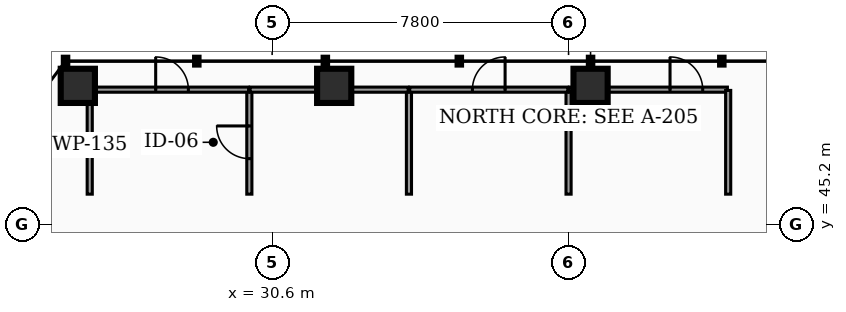
"""IFC4 building model, lengths in metres.
Left out: names, types, materials, properties, quantities, classifications, styles, units other than length and angle.
Written with IfcOpenShell. Run it as: python <this file> out.ifc"""

import sys

from ifc_helpers import new_model, si_unit, direction, frame, frame_2d, origin, origin_2d, place, context, subcontext, project, spatial, rectangle, hollow_rectangle, extrude, element, fill, save


model = new_model("IFC4")
c1 = context("Model", 3, precision=1e-05, world=origin(), true_north=direction((0.0, 1.0)))
c2 = subcontext(c1, "Body", "Model", "MODEL_VIEW")
j1 = project(units=[si_unit("LENGTHUNIT", "METRE"), si_unit("PLANEANGLEUNIT", "RADIAN")], contexts=[c1])
p1 = place(None, origin())
s1 = spatial("IfcSite", under=j1, at=p1, CompositionType="ELEMENT")
p2 = place(p1, origin())
s2 = spatial("IfcBuilding", under=s1, at=p2, CompositionType="ELEMENT")
p3 = place(p2, frame((0.0, 0.0, 96.9)))
s3 = spatial("IfcBuildingStorey", under=s2, at=p3, CompositionType="ELEMENT", Elevation=96.9)
for number, where, z_axis, x_axis in (
    (1, (38.979, 48.85, 0.0), (0.0, 0.0, 1.0), (1.0, 0.0, 0.0)),
    (2, (32.233, 48.85, 0.0), (0.0, 0.0, 1.0), (1.0, 0.0, 0.0)),
    (3, (25.487, 48.85, 0.0), (0.0, 0.0, 1.0), (1.0, 0.0, 0.0)),
):
    element("IfcColumn", number, at=place(p3, frame(where, z_axis=z_axis, x_axis=x_axis)), inside=s3, PredefinedType="COLUMN", context=c2, shape_type="SweptSolid", body=[
        extrude(hollow_rectangle(XDim=0.9, YDim=0.9, WallThickness=0.045, at=origin_2d()), origin(), (0.0, 0.0, 1.0), 3.82),
    ])
p4 = place(p3, frame((30.0, 46.0, 0.0), z_axis=(0.0, 0.0, 1.0), x_axis=(0.0, 1.0, 0.0)))
e4 = element("IfcWall", 4, at=p4, inside=s3, PredefinedType="PARTITIONING", context=c2, shape_type="SweptSolid", body=[
    extrude(rectangle(XDim=2.73, YDim=0.135, at=frame_2d((1.365, 0.0))), origin(), (0.0, 0.0, 1.0), 2.777),
])
p5 = place(p4, frame((0.935, 0.0, 0.0)))
e5 = element("IfcOpeningElement", 5, at=p5, cuts=e4, PredefinedType="OPENING", context=c2, shape_type="SweptSolid", body=[
    extrude(rectangle(XDim=0.86, YDim=2.05, at=frame_2d((0.43, 1.025))), frame((0.0, 0.077, 0.0), z_axis=(0.0, -1.0, 0.0), x_axis=(1.0, 0.0, 0.0)), (0.0, 0.0, 1.0), 0.155),
])
p6 = place(p3, frame((25.951, 48.75, 0.0), z_axis=(0.0, 0.0, 1.0), x_axis=(1.0, 0.0, 0.0)))
e6 = element("IfcWall", 6, at=p6, inside=s3, PredefinedType="PARTITIONING", context=c2, shape_type="SweptSolid", body=[
    extrude(rectangle(XDim=4.029, YDim=0.135, at=frame_2d((2.015, 0.0))), origin(), (0.0, 0.0, 1.0), 2.777),
])
p7 = place(p6, frame((1.584, 0.0, 0.0)))
e7 = element("IfcOpeningElement", 7, at=p7, cuts=e6, PredefinedType="OPENING", context=c2, shape_type="SweptSolid", body=[
    extrude(rectangle(XDim=0.86, YDim=2.05, at=frame_2d((0.43, 1.025))), frame((0.0, 0.077, 0.0), z_axis=(0.0, -1.0, 0.0), x_axis=(1.0, 0.0, 0.0)), (0.0, 0.0, 1.0), 0.155),
])
p8 = place(p3, frame((25.8, 46.0, 0.0), z_axis=(0.0, 0.0, 1.0), x_axis=(0.0, 1.0, 0.0)))
e8 = element("IfcWall", 8, at=p8, inside=s3, PredefinedType="PARTITIONING", context=c2, shape_type="SweptSolid", body=[
    extrude(rectangle(XDim=2.599, YDim=0.135, at=frame_2d((1.3, 0.0))), origin(), (0.0, 0.0, 1.0), 2.777),
])
p9 = place(p3, frame((34.2, 46.0, 0.0), z_axis=(0.0, 0.0, 1.0), x_axis=(0.0, 1.0, 0.0)))
e9 = element("IfcWall", 9, at=p9, inside=s3, PredefinedType="PARTITIONING", context=c2, shape_type="SweptSolid", body=[
    extrude(rectangle(XDim=2.73, YDim=0.135, at=frame_2d((1.365, 0.0))), origin(), (0.0, 0.0, 1.0), 2.777),
])
p10 = place(p3, frame((30.02, 48.75, 0.0), z_axis=(0.0, 0.0, 1.0), x_axis=(1.0, 0.0, 0.0)))
e10 = element("IfcWall", 10, at=p10, inside=s3, PredefinedType="PARTITIONING", context=c2, shape_type="SweptSolid", body=[
    extrude(rectangle(XDim=1.755, YDim=0.135, at=frame_2d((0.877, 0.0))), origin(), (0.0, 0.0, 1.0), 2.777),
])
p11 = place(p3, frame((32.198, 48.75, 0.0), z_axis=(0.0, 0.0, 1.0), x_axis=(1.0, 0.0, 0.0)))
e11 = element("IfcWall", 11, at=p11, inside=s3, PredefinedType="PARTITIONING", context=c2, shape_type="SweptSolid", body=[
    extrude(rectangle(XDim=1.982, YDim=0.135, at=frame_2d((0.991, 0.0))), origin(), (0.0, 0.0, 1.0), 2.777),
])
p12 = place(p3, frame((38.4, 46.0, 0.0), z_axis=(0.0, 0.0, 1.0), x_axis=(0.0, 1.0, 0.0)))
e12 = element("IfcWall", 12, at=p12, inside=s3, PredefinedType="PARTITIONING", context=c2, shape_type="SweptSolid", body=[
    extrude(rectangle(XDim=2.73, YDim=0.135, at=frame_2d((1.365, 0.0))), origin(), (0.0, 0.0, 1.0), 2.777),
])
p13 = place(p3, frame((34.22, 48.75, 0.0), z_axis=(0.0, 0.0, 1.0), x_axis=(1.0, 0.0, 0.0)))
e13 = element("IfcWall", 13, at=p13, inside=s3, PredefinedType="PARTITIONING", context=c2, shape_type="SweptSolid", body=[
    extrude(rectangle(XDim=4.16, YDim=0.135, at=frame_2d((2.08, 0.0))), origin(), (0.0, 0.0, 1.0), 2.777),
])
p14 = place(p13, frame((1.65, 0.0, 0.0)))
e14 = element("IfcOpeningElement", 14, at=p14, cuts=e13, PredefinedType="OPENING", context=c2, shape_type="SweptSolid", body=[
    extrude(rectangle(XDim=0.86, YDim=2.05, at=frame_2d((0.43, 1.025))), frame((0.0, 0.077, 0.0), z_axis=(0.0, -1.0, 0.0), x_axis=(1.0, 0.0, 0.0)), (0.0, 0.0, 1.0), 0.155),
])
p15 = place(p3, frame((38.42, 48.75, 0.0), z_axis=(0.0, 0.0, 1.0), x_axis=(1.0, 0.0, 0.0)))
e15 = element("IfcWall", 15, at=p15, inside=s3, PredefinedType="PARTITIONING", context=c2, shape_type="SweptSolid", body=[
    extrude(rectangle(XDim=4.16, YDim=0.135, at=frame_2d((2.08, 0.0))), origin(), (0.0, 0.0, 1.0), 2.777),
])
p16 = place(p15, frame((2.65, 0.0, 0.0)))
e16 = element("IfcOpeningElement", 16, at=p16, cuts=e15, PredefinedType="OPENING", context=c2, shape_type="SweptSolid", body=[
    extrude(rectangle(XDim=0.86, YDim=2.05, at=frame_2d((0.43, 1.025))), frame((0.0, 0.077, 0.0), z_axis=(0.0, -1.0, 0.0), x_axis=(1.0, 0.0, 0.0)), (0.0, 0.0, 1.0), 0.155),
])
p17 = place(p3, frame((42.6, 46.0, 0.0), z_axis=(0.0, 0.0, 1.0), x_axis=(0.0, 1.0, 0.0)))
e17 = element("IfcWall", 17, at=p17, inside=s3, PredefinedType="PARTITIONING", context=c2, shape_type="SweptSolid", body=[
    extrude(rectangle(XDim=2.73, YDim=0.135, at=frame_2d((1.365, 0.0))), origin(), (0.0, 0.0, 1.0), 2.777),
])
p18 = place(p3, frame((32.0, 48.977, 0.0), z_axis=(0.0, 0.0, 1.0), x_axis=(0.0, 1.0, 0.0)))
e18 = element("IfcWall", 18, at=p18, inside=s3, PredefinedType="PARTITIONING", context=c2, shape_type="SweptSolid", body=[
    extrude(rectangle(XDim=0.509, YDim=0.12, at=frame_2d((0.254, 0.0))), origin(), (0.0, 0.0, 1.0), 2.777),
])
p19 = place(p5, origin())
e19 = element("IfcDoor", 19, at=p19, inside=s3, OperationType="SINGLE_SWING_RIGHT", PredefinedType="DOOR", context=c2, shape_type="SweptSolid", body=[
    extrude(rectangle(XDim=0.86, YDim=2.05, at=frame_2d((0.43, 1.025))), frame((0.0, 0.025, 0.0), z_axis=(0.0, -1.0, 0.0), x_axis=(1.0, 0.0, 0.0)), (0.0, 0.0, 1.0), 0.05),
])
fill(e5, e19)
p20 = place(p7, origin())
e20 = element("IfcDoor", 20, at=p20, inside=s3, OperationType="SINGLE_SWING_LEFT", PredefinedType="DOOR", context=c2, shape_type="SweptSolid", body=[
    extrude(rectangle(XDim=0.86, YDim=2.05, at=frame_2d((0.43, 1.025))), frame((0.0, 0.025, 0.0), z_axis=(0.0, -1.0, 0.0), x_axis=(1.0, 0.0, 0.0)), (0.0, 0.0, 1.0), 0.05),
])
fill(e7, e20)
p21 = place(p14, origin())
e21 = element("IfcDoor", 21, at=p21, inside=s3, OperationType="SINGLE_SWING_RIGHT", PredefinedType="DOOR", context=c2, shape_type="SweptSolid", body=[
    extrude(rectangle(XDim=0.86, YDim=2.05, at=frame_2d((0.43, 1.025))), frame((0.0, 0.025, 0.0), z_axis=(0.0, -1.0, 0.0), x_axis=(1.0, 0.0, 0.0)), (0.0, 0.0, 1.0), 0.05),
])
fill(e14, e21)
p22 = place(p16, origin())
e22 = element("IfcDoor", 22, at=p22, inside=s3, OperationType="SINGLE_SWING_LEFT", PredefinedType="DOOR", context=c2, shape_type="SweptSolid", body=[
    extrude(rectangle(XDim=0.86, YDim=2.05, at=frame_2d((0.43, 1.025))), frame((0.0, 0.025, 0.0), z_axis=(0.0, -1.0, 0.0), x_axis=(1.0, 0.0, 0.0)), (0.0, 0.0, 1.0), 0.05),
])
fill(e16, e22)
save(model, sys.argv[1])
